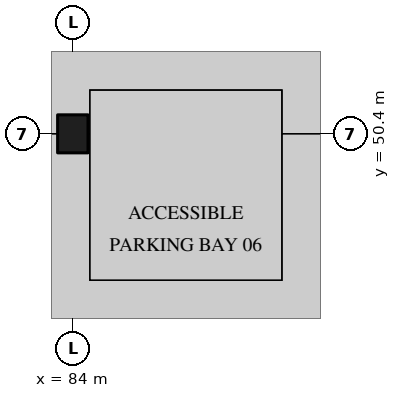
"""IFC4 building model, lengths in metres.
Left out: names, types, materials, properties, quantities, classifications, styles, units other than length and angle.
Written with IfcOpenShell. Run it as: python <this file> out.ifc"""

import sys

from ifc_helpers import new_model, si_unit, direction, frame, origin, origin_2d, place, context, subcontext, project, spatial, rectangle, extrude, element, save


model = new_model("IFC4")
c1 = context("Model", 3, precision=1e-05, world=origin(), true_north=direction((0.0, 1.0)))
c2 = subcontext(c1, "Body", "Model", "MODEL_VIEW")
j1 = project(units=[si_unit("LENGTHUNIT", "METRE"), si_unit("PLANEANGLEUNIT", "RADIAN")], contexts=[c1])
p1 = place(None, origin())
s1 = spatial("IfcSite", under=j1, at=p1, CompositionType="ELEMENT")
p2 = place(p1, origin())
s2 = spatial("IfcBuilding", under=s1, at=p2, CompositionType="ELEMENT")
p3 = place(p2, frame((0.0, 0.0, -4.5)))
s3 = spatial("IfcBuildingStorey", under=s2, at=p3, CompositionType="ELEMENT", Elevation=-4.5)
p4 = place(p3, frame((84.0, 50.4, 0.0), z_axis=(0.0, 0.0, 1.0), x_axis=(1.0, 0.0, 0.0)))
e1 = element("IfcColumn", 1, at=p4, inside=s3, PredefinedType="COLUMN", context=c2, shape_type="SweptSolid", body=[
    extrude(rectangle(XDim=0.8, YDim=1.0, at=origin_2d()), origin(), (0.0, 0.0, 1.0), 4.05),
])
save(model, sys.argv[1])
